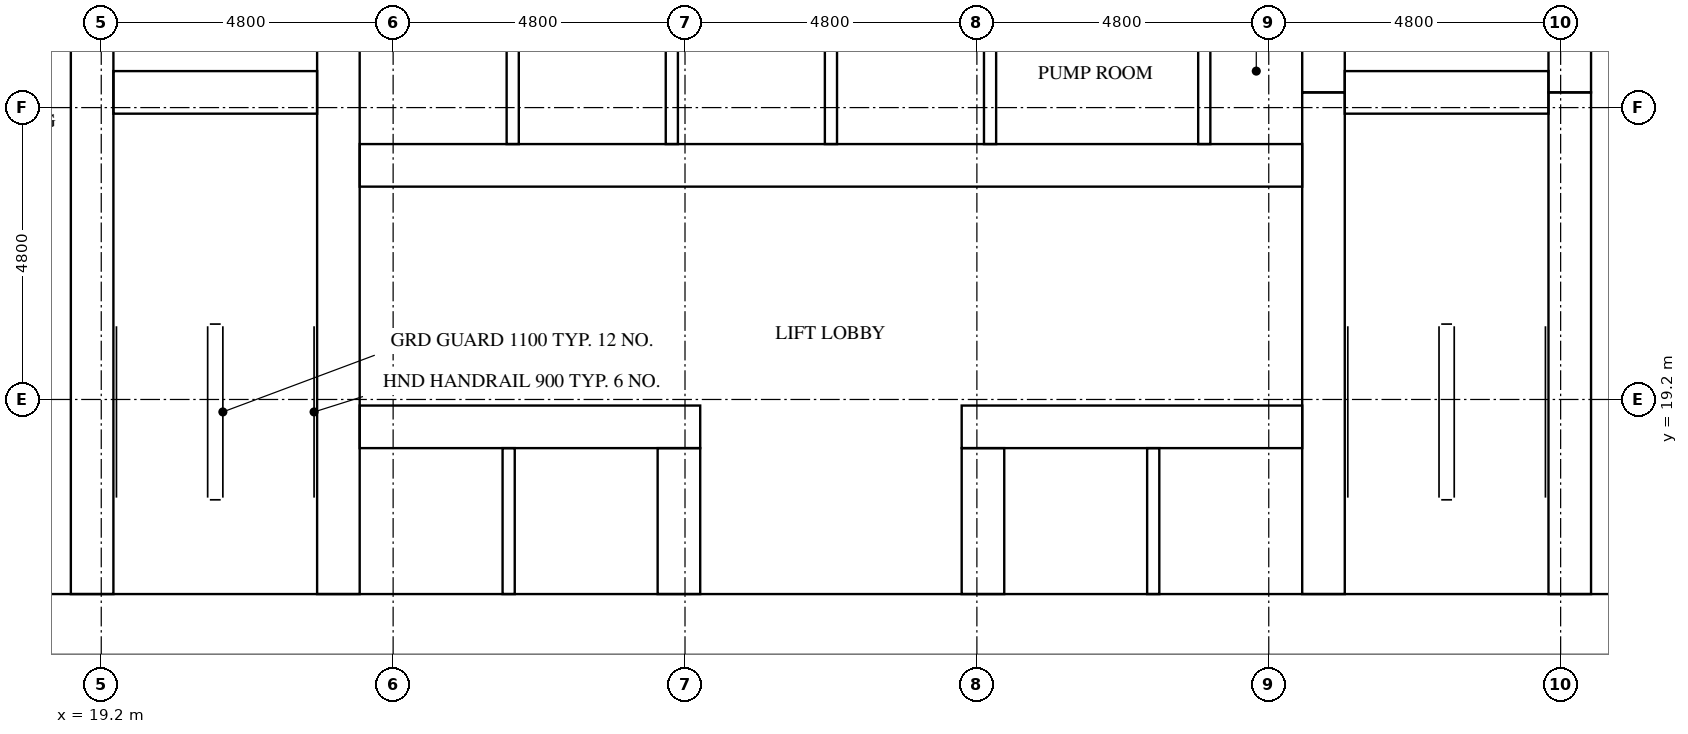
"""IFC4 building model, lengths in metres.
Left out: names, types, materials, properties, quantities, classifications, styles, units other than length and angle.
Written with IfcOpenShell. Run it as: python <this file> out.ifc"""

import sys

from ifc_helpers import new_model, si_unit, direction, frame, frame_2d, origin, place, context, subcontext, project, spatial, rectangle, extrude, element, fill, save


model = new_model("IFC4")
c1 = context("Model", 3, precision=1e-05, world=origin(), true_north=direction((0.0, 1.0)))
c2 = subcontext(c1, "Body", "Model", "MODEL_VIEW")
j1 = project(units=[si_unit("LENGTHUNIT", "METRE"), si_unit("PLANEANGLEUNIT", "RADIAN")], contexts=[c1])
p1 = place(None, origin())
s1 = spatial("IfcSite", under=j1, at=p1, CompositionType="ELEMENT")
p2 = place(p1, origin())
s2 = spatial("IfcBuilding", under=s1, at=p2, CompositionType="ELEMENT")
p3 = place(p2, frame((0.0, 0.0, 36.4)))
s3 = spatial("IfcBuildingStorey", under=s2, at=p3, CompositionType="ELEMENT", Elevation=36.4)
p4 = place(p3, frame((15.0, 15.5, 0.0), z_axis=(0.0, 0.0, 1.0), x_axis=(1.0, 0.0, 0.0)))
e1 = element("IfcWall", 1, at=p4, inside=s3, PredefinedType="SHEAR", context=c2, shape_type="SweptSolid", body=[
    extrude(rectangle(XDim=32.4, YDim=1.0, at=frame_2d((16.2, 0.0))), origin(), (0.0, 0.0, 1.0), 3.2),
])
p5 = place(p4, frame((15.3, 0.0, 0.0)))
e2 = element("IfcOpeningElement", 2, at=p5, cuts=e1, PredefinedType="OPENING", context=c2, shape_type="SweptSolid", body=[
    extrude(rectangle(XDim=1.8, YDim=2.1, at=frame_2d((0.9, 1.05))), frame((0.0, 0.51, 0.0), z_axis=(0.0, -1.0, 0.0), x_axis=(1.0, 0.0, 0.0)), (0.0, 0.0, 1.0), 1.02),
])
p6 = place(p3, frame((19.05, 16.0, 0.0), z_axis=(0.0, 0.0, 1.0), x_axis=(0.0, 1.0, 0.0)))
e3 = element("IfcWall", 3, at=p6, inside=s3, PredefinedType="SHEAR", context=c2, shape_type="SweptSolid", body=[
    extrude(rectangle(XDim=14.9, YDim=0.7, at=frame_2d((7.45, 0.0))), origin(), (0.0, 0.0, 1.0), 3.2),
])
p7 = place(p6, frame((9.45, 0.0, 0.0)))
e4 = element("IfcOpeningElement", 4, at=p7, cuts=e3, PredefinedType="OPENING", context=c2, shape_type="SweptSolid", body=[
    extrude(rectangle(XDim=1.1, YDim=2.1, at=frame_2d((0.55, 1.05))), frame((0.0, 0.36, 0.0), z_axis=(0.0, -1.0, 0.0), x_axis=(1.0, 0.0, 0.0)), (0.0, 0.0, 1.0), 0.72),
])
p8 = place(p6, frame((12.95, 0.0, 0.0)))
e5 = element("IfcOpeningElement", 5, at=p8, cuts=e3, PredefinedType="OPENING", context=c2, shape_type="SweptSolid", body=[
    extrude(rectangle(XDim=1.1, YDim=2.1, at=frame_2d((0.55, 1.05))), frame((0.0, 0.36, 0.0), z_axis=(0.0, -1.0, 0.0), x_axis=(1.0, 0.0, 0.0)), (0.0, 0.0, 1.0), 0.72),
])
p9 = place(p6, frame((0.2, 0.0, 0.0)))
e6 = element("IfcOpeningElement", 6, at=p9, cuts=e3, PredefinedType="OPENING", context=c2, shape_type="SweptSolid", body=[
    extrude(rectangle(XDim=1.2, YDim=2.1, at=frame_2d((0.6, 1.05))), frame((0.0, 0.36, 0.0), z_axis=(0.0, -1.0, 0.0), x_axis=(1.0, 0.0, 0.0)), (0.0, 0.0, 1.0), 0.72),
])
p10 = place(p3, frame((23.1, 16.0, 0.0), z_axis=(0.0, 0.0, 1.0), x_axis=(0.0, 1.0, 0.0)))
e7 = element("IfcWall", 7, at=p10, inside=s3, PredefinedType="SHEAR", context=c2, shape_type="SweptSolid", body=[
    extrude(rectangle(XDim=20.8, YDim=0.7, at=frame_2d((10.4, 0.0))), origin(), (0.0, 0.0, 1.0), 3.2),
])
p11 = place(p3, frame((39.3, 16.0, 0.0), z_axis=(0.0, 0.0, 1.0), x_axis=(0.0, 1.0, 0.0)))
e8 = element("IfcWall", 8, at=p11, inside=s3, PredefinedType="SHEAR", context=c2, shape_type="SweptSolid", body=[
    extrude(rectangle(XDim=8.25, YDim=0.7, at=frame_2d((4.125, 0.0))), origin(), (0.0, 0.0, 1.0), 3.2),
])
p12 = place(p3, frame((39.3, 24.25, 0.0), z_axis=(0.0, 0.0, 1.0), x_axis=(0.0, 1.0, 0.0)))
e9 = element("IfcWall", 9, at=p12, inside=s3, PredefinedType="SHEAR", context=c2, shape_type="SweptSolid", body=[
    extrude(rectangle(XDim=3.5, YDim=0.7, at=frame_2d((1.75, 0.0))), origin(), (0.0, 0.0, 1.0), 3.2),
])
p13 = place(p3, frame((43.35, 16.0, 0.0), z_axis=(0.0, 0.0, 1.0), x_axis=(0.0, 1.0, 0.0)))
e10 = element("IfcWall", 10, at=p13, inside=s3, PredefinedType="SHEAR", context=c2, shape_type="SweptSolid", body=[
    extrude(rectangle(XDim=8.25, YDim=0.7, at=frame_2d((4.125, 0.0))), origin(), (0.0, 0.0, 1.0), 3.2),
])
p14 = place(p13, frame((0.2, 0.0, 0.0)))
e11 = element("IfcOpeningElement", 11, at=p14, cuts=e10, PredefinedType="OPENING", context=c2, shape_type="SweptSolid", body=[
    extrude(rectangle(XDim=1.2, YDim=2.1, at=frame_2d((0.6, 1.05))), frame((0.0, 0.36, 0.0), z_axis=(0.0, -1.0, 0.0), x_axis=(1.0, 0.0, 0.0)), (0.0, 0.0, 1.0), 0.72),
])
p15 = place(p3, frame((43.35, 24.25, 0.0), z_axis=(0.0, 0.0, 1.0), x_axis=(0.0, 1.0, 0.0)))
e12 = element("IfcWall", 12, at=p15, inside=s3, PredefinedType="SHEAR", context=c2, shape_type="SweptSolid", body=[
    extrude(rectangle(XDim=3.5, YDim=0.7, at=frame_2d((1.75, 0.0))), origin(), (0.0, 0.0, 1.0), 3.2),
])
p16 = place(p15, frame((1.2, 0.0, 0.0)))
e13 = element("IfcOpeningElement", 13, at=p16, cuts=e12, PredefinedType="OPENING", context=c2, shape_type="SweptSolid", body=[
    extrude(rectangle(XDim=1.1, YDim=2.1, at=frame_2d((0.55, 1.05))), frame((0.0, 0.36, 0.0), z_axis=(0.0, -1.0, 0.0), x_axis=(1.0, 0.0, 0.0)), (0.0, 0.0, 1.0), 0.72),
])
for number, where, z_axis, x_axis in (
    (14, (19.4, 24.25, 0.0), (0.0, 0.0, 1.0), (1.0, 0.0, 0.0)),
    (15, (39.65, 24.25, 0.0), (0.0, 0.0, 1.0), (1.0, 0.0, 0.0)),
):
    element("IfcWall", number, at=place(p3, frame(where, z_axis=z_axis, x_axis=x_axis)), inside=s3, PredefinedType="SHEAR", context=c2, shape_type="SweptSolid", body=[
        extrude(rectangle(XDim=3.35, YDim=0.7, at=frame_2d((1.675, 0.0))), origin(), (0.0, 0.0, 1.0), 3.2),
    ])
p17 = place(p3, frame((23.45, 18.75, 0.0), z_axis=(0.0, 0.0, 1.0), x_axis=(1.0, 0.0, 0.0)))
e16 = element("IfcWall", 16, at=p17, inside=s3, PredefinedType="SHEAR", context=c2, shape_type="SweptSolid", body=[
    extrude(rectangle(XDim=5.6, YDim=0.7, at=frame_2d((2.8, 0.0))), origin(), (0.0, 0.0, 1.0), 3.2),
])
p18 = place(p17, frame((0.625, 0.0, 0.0)))
e17 = element("IfcOpeningElement", 17, at=p18, cuts=e16, PredefinedType="OPENING", context=c2, shape_type="SweptSolid", body=[
    extrude(rectangle(XDim=1.1, YDim=2.1, at=frame_2d((0.55, 1.05))), frame((0.0, 0.36, 0.0), z_axis=(0.0, -1.0, 0.0), x_axis=(1.0, 0.0, 0.0)), (0.0, 0.0, 1.0), 0.72),
])
p19 = place(p17, frame((3.175, 0.0, 0.0)))
e18 = element("IfcOpeningElement", 18, at=p19, cuts=e16, PredefinedType="OPENING", context=c2, shape_type="SweptSolid", body=[
    extrude(rectangle(XDim=1.1, YDim=2.1, at=frame_2d((0.55, 1.05))), frame((0.0, 0.36, 0.0), z_axis=(0.0, -1.0, 0.0), x_axis=(1.0, 0.0, 0.0)), (0.0, 0.0, 1.0), 0.72),
])
p20 = place(p3, frame((33.35, 18.75, 0.0), z_axis=(0.0, 0.0, 1.0), x_axis=(1.0, 0.0, 0.0)))
e19 = element("IfcWall", 19, at=p20, inside=s3, PredefinedType="SHEAR", context=c2, shape_type="SweptSolid", body=[
    extrude(rectangle(XDim=5.6, YDim=0.7, at=frame_2d((2.8, 0.0))), origin(), (0.0, 0.0, 1.0), 3.2),
])
p21 = place(p20, frame((1.325, 0.0, 0.0)))
e20 = element("IfcOpeningElement", 20, at=p21, cuts=e19, PredefinedType="OPENING", context=c2, shape_type="SweptSolid", body=[
    extrude(rectangle(XDim=1.1, YDim=2.1, at=frame_2d((0.55, 1.05))), frame((0.0, 0.36, 0.0), z_axis=(0.0, -1.0, 0.0), x_axis=(1.0, 0.0, 0.0)), (0.0, 0.0, 1.0), 0.72),
])
p22 = place(p20, frame((3.875, 0.0, 0.0)))
e21 = element("IfcOpeningElement", 21, at=p22, cuts=e19, PredefinedType="OPENING", context=c2, shape_type="SweptSolid", body=[
    extrude(rectangle(XDim=1.1, YDim=2.1, at=frame_2d((0.55, 1.05))), frame((0.0, 0.36, 0.0), z_axis=(0.0, -1.0, 0.0), x_axis=(1.0, 0.0, 0.0)), (0.0, 0.0, 1.0), 0.72),
])
p23 = place(p3, frame((23.45, 23.05, 0.0), z_axis=(0.0, 0.0, 1.0), x_axis=(1.0, 0.0, 0.0)))
e22 = element("IfcWall", 22, at=p23, inside=s3, PredefinedType="SHEAR", context=c2, shape_type="SweptSolid", body=[
    extrude(rectangle(XDim=15.5, YDim=0.7, at=frame_2d((7.75, 0.0))), origin(), (0.0, 0.0, 1.0), 3.2),
])
p24 = place(p23, frame((0.658, 0.0, 0.0)))
e23 = element("IfcOpeningElement", 23, at=p24, cuts=e22, PredefinedType="OPENING", context=c2, shape_type="SweptSolid", body=[
    extrude(rectangle(XDim=1.1, YDim=2.1, at=frame_2d((0.55, 1.05))), frame((0.0, 0.36, 0.0), z_axis=(0.0, -1.0, 0.0), x_axis=(1.0, 0.0, 0.0)), (0.0, 0.0, 1.0), 0.72),
])
p25 = place(p23, frame((3.275, 0.0, 0.0)))
e24 = element("IfcOpeningElement", 24, at=p25, cuts=e22, PredefinedType="OPENING", context=c2, shape_type="SweptSolid", body=[
    extrude(rectangle(XDim=1.1, YDim=2.1, at=frame_2d((0.55, 1.05))), frame((0.0, 0.36, 0.0), z_axis=(0.0, -1.0, 0.0), x_axis=(1.0, 0.0, 0.0)), (0.0, 0.0, 1.0), 0.72),
])
p26 = place(p23, frame((11.628, 0.0, 0.0)))
e25 = element("IfcOpeningElement", 25, at=p26, cuts=e22, PredefinedType="OPENING", context=c2, shape_type="SweptSolid", body=[
    extrude(rectangle(XDim=1.0, YDim=2.1, at=frame_2d((0.5, 1.05))), frame((0.0, 0.36, 0.0), z_axis=(0.0, -1.0, 0.0), x_axis=(1.0, 0.0, 0.0)), (0.0, 0.0, 1.0), 0.72),
])
p27 = place(p23, frame((14.245, 0.0, 0.0)))
e26 = element("IfcOpeningElement", 26, at=p27, cuts=e22, PredefinedType="OPENING", context=c2, shape_type="SweptSolid", body=[
    extrude(rectangle(XDim=1.0, YDim=2.1, at=frame_2d((0.5, 1.05))), frame((0.0, 0.36, 0.0), z_axis=(0.0, -1.0, 0.0), x_axis=(1.0, 0.0, 0.0)), (0.0, 0.0, 1.0), 0.72),
])
for number, where, z_axis, x_axis in (
    (27, (28.7, 16.0, 0.0), (0.0, 0.0, 1.0), (0.0, 1.0, 0.0)),
    (28, (33.7, 16.0, 0.0), (0.0, 0.0, 1.0), (0.0, 1.0, 0.0)),
):
    element("IfcWall", number, at=place(p3, frame(where, z_axis=z_axis, x_axis=x_axis)), inside=s3, PredefinedType="SHEAR", context=c2, shape_type="SweptSolid", body=[
        extrude(rectangle(XDim=2.4, YDim=0.7, at=frame_2d((1.2, 0.0))), origin(), (0.0, 0.0, 1.0), 3.2),
    ])
for number, where, z_axis, x_axis in (
    (29, (25.967, 23.4, 0.0), (0.0, 0.0, 1.0), (0.0, 1.0, 0.0)),
    (30, (28.583, 23.4, 0.0), (0.0, 0.0, 1.0), (0.0, 1.0, 0.0)),
    (31, (31.2, 23.4, 0.0), (0.0, 0.0, 1.0), (0.0, 1.0, 0.0)),
    (32, (33.817, 23.4, 0.0), (0.0, 0.0, 1.0), (0.0, 1.0, 0.0)),
):
    element("IfcWall", number, at=place(p3, frame(where, z_axis=z_axis, x_axis=x_axis)), inside=s3, PredefinedType="SOLIDWALL", context=c2, shape_type="SweptSolid", body=[
        extrude(rectangle(XDim=2.4, YDim=0.2, at=frame_2d((1.2, 0.0))), origin(), (0.0, 0.0, 1.0), 3.2),
    ])
for number, where, z_axis, x_axis in (
    (33, (25.9, 16.0, 0.0), (0.0, 0.0, 1.0), (0.0, 1.0, 0.0)),
    (34, (36.5, 16.0, 0.0), (0.0, 0.0, 1.0), (0.0, 1.0, 0.0)),
):
    element("IfcWall", number, at=place(p3, frame(where, z_axis=z_axis, x_axis=x_axis)), inside=s3, PredefinedType="SOLIDWALL", context=c2, shape_type="SweptSolid", body=[
        extrude(rectangle(XDim=2.4, YDim=0.2, at=frame_2d((1.2, 0.0))), origin(), (0.0, 0.0, 1.0), 3.2),
    ])
p28 = place(p3, frame((37.339, 23.4, 0.0), z_axis=(0.0, 0.0, 1.0), x_axis=(0.0, 1.0, 0.0)))
e35 = element("IfcWall", 35, at=p28, inside=s3, PredefinedType="PARTITIONING", context=c2, shape_type="SweptSolid", body=[
    extrude(rectangle(XDim=2.4, YDim=0.2, at=frame_2d((1.2, 0.0))), origin(), (0.0, 0.0, 1.0), 3.2),
])
p29 = place(p18, origin())
e36 = element("IfcDoor", 36, at=p29, inside=s3, OperationType="DOUBLE_DOOR_SLIDING", PredefinedType="DOOR", context=c2, shape_type="SweptSolid", body=[
    extrude(rectangle(XDim=1.1, YDim=2.1, at=frame_2d((0.55, 1.05))), frame((0.0, 0.025, 0.0), z_axis=(0.0, -1.0, 0.0), x_axis=(1.0, 0.0, 0.0)), (0.0, 0.0, 1.0), 0.05),
])
fill(e17, e36)
p30 = place(p19, origin())
e37 = element("IfcDoor", 37, at=p30, inside=s3, OperationType="DOUBLE_DOOR_SLIDING", PredefinedType="DOOR", context=c2, shape_type="SweptSolid", body=[
    extrude(rectangle(XDim=1.1, YDim=2.1, at=frame_2d((0.55, 1.05))), frame((0.0, 0.025, 0.0), z_axis=(0.0, -1.0, 0.0), x_axis=(1.0, 0.0, 0.0)), (0.0, 0.0, 1.0), 0.05),
])
fill(e18, e37)
p31 = place(p21, origin())
e38 = element("IfcDoor", 38, at=p31, inside=s3, OperationType="DOUBLE_DOOR_SLIDING", PredefinedType="DOOR", context=c2, shape_type="SweptSolid", body=[
    extrude(rectangle(XDim=1.1, YDim=2.1, at=frame_2d((0.55, 1.05))), frame((0.0, 0.025, 0.0), z_axis=(0.0, -1.0, 0.0), x_axis=(1.0, 0.0, 0.0)), (0.0, 0.0, 1.0), 0.05),
])
fill(e20, e38)
p32 = place(p22, origin())
e39 = element("IfcDoor", 39, at=p32, inside=s3, OperationType="DOUBLE_DOOR_SLIDING", PredefinedType="DOOR", context=c2, shape_type="SweptSolid", body=[
    extrude(rectangle(XDim=1.1, YDim=2.1, at=frame_2d((0.55, 1.05))), frame((0.0, 0.025, 0.0), z_axis=(0.0, -1.0, 0.0), x_axis=(1.0, 0.0, 0.0)), (0.0, 0.0, 1.0), 0.05),
])
fill(e21, e39)
p33 = place(p24, origin())
e40 = element("IfcDoor", 40, at=p33, inside=s3, OperationType="DOUBLE_DOOR_SLIDING", PredefinedType="DOOR", context=c2, shape_type="SweptSolid", body=[
    extrude(rectangle(XDim=1.1, YDim=2.1, at=frame_2d((0.55, 1.05))), frame((0.0, 0.025, 0.0), z_axis=(0.0, -1.0, 0.0), x_axis=(1.0, 0.0, 0.0)), (0.0, 0.0, 1.0), 0.05),
])
fill(e23, e40)
p34 = place(p25, origin())
e41 = element("IfcDoor", 41, at=p34, inside=s3, OperationType="DOUBLE_DOOR_SLIDING", PredefinedType="DOOR", context=c2, shape_type="SweptSolid", body=[
    extrude(rectangle(XDim=1.1, YDim=2.1, at=frame_2d((0.55, 1.05))), frame((0.0, 0.025, 0.0), z_axis=(0.0, -1.0, 0.0), x_axis=(1.0, 0.0, 0.0)), (0.0, 0.0, 1.0), 0.05),
])
fill(e24, e41)
p35 = place(p9, frame((1.2, 0.0, 0.0), z_axis=(0.0, 0.0, 1.0), x_axis=(-1.0, 0.0, 0.0)))
e42 = element("IfcDoor", 42, at=p35, inside=s3, OperationType="SINGLE_SWING_RIGHT", PredefinedType="DOOR", context=c2, shape_type="SweptSolid", body=[
    extrude(rectangle(XDim=1.2, YDim=2.1, at=frame_2d((0.6, 1.05))), frame((0.0, 0.025, 0.0), z_axis=(0.0, -1.0, 0.0), x_axis=(1.0, 0.0, 0.0)), (0.0, 0.0, 1.0), 0.05),
])
fill(e6, e42)
p36 = place(p14, origin())
e43 = element("IfcDoor", 43, at=p36, inside=s3, OperationType="SINGLE_SWING_LEFT", PredefinedType="DOOR", context=c2, shape_type="SweptSolid", body=[
    extrude(rectangle(XDim=1.2, YDim=2.1, at=frame_2d((0.6, 1.05))), frame((0.0, 0.025, 0.0), z_axis=(0.0, -1.0, 0.0), x_axis=(1.0, 0.0, 0.0)), (0.0, 0.0, 1.0), 0.05),
])
fill(e11, e43)
p37 = place(p5, frame((1.8, 0.0, 0.0), z_axis=(0.0, 0.0, 1.0), x_axis=(-1.0, 0.0, 0.0)))
e44 = element("IfcDoor", 44, at=p37, inside=s3, OperationType="DOUBLE_DOOR_SINGLE_SWING", PredefinedType="DOOR", context=c2, shape_type="SweptSolid", body=[
    extrude(rectangle(XDim=1.8, YDim=2.1, at=frame_2d((0.9, 1.05))), frame((0.0, 0.025, 0.0), z_axis=(0.0, -1.0, 0.0), x_axis=(1.0, 0.0, 0.0)), (0.0, 0.0, 1.0), 0.05),
])
fill(e2, e44)
p38 = place(p26, frame((1.0, 0.0, 0.0), z_axis=(0.0, 0.0, 1.0), x_axis=(-1.0, 0.0, 0.0)))
e45 = element("IfcDoor", 45, at=p38, inside=s3, OperationType="SINGLE_SWING_LEFT", PredefinedType="DOOR", context=c2, shape_type="SweptSolid", body=[
    extrude(rectangle(XDim=1.0, YDim=2.1, at=frame_2d((0.5, 1.05))), frame((0.0, 0.025, 0.0), z_axis=(0.0, -1.0, 0.0), x_axis=(1.0, 0.0, 0.0)), (0.0, 0.0, 1.0), 0.05),
])
fill(e25, e45)
p39 = place(p27, frame((1.0, 0.0, 0.0), z_axis=(0.0, 0.0, 1.0), x_axis=(-1.0, 0.0, 0.0)))
e46 = element("IfcDoor", 46, at=p39, inside=s3, OperationType="SINGLE_SWING_RIGHT", PredefinedType="DOOR", context=c2, shape_type="SweptSolid", body=[
    extrude(rectangle(XDim=1.0, YDim=2.1, at=frame_2d((0.5, 1.05))), frame((0.0, 0.025, 0.0), z_axis=(0.0, -1.0, 0.0), x_axis=(1.0, 0.0, 0.0)), (0.0, 0.0, 1.0), 0.05),
])
fill(e26, e46)
save(model, sys.argv[1])
